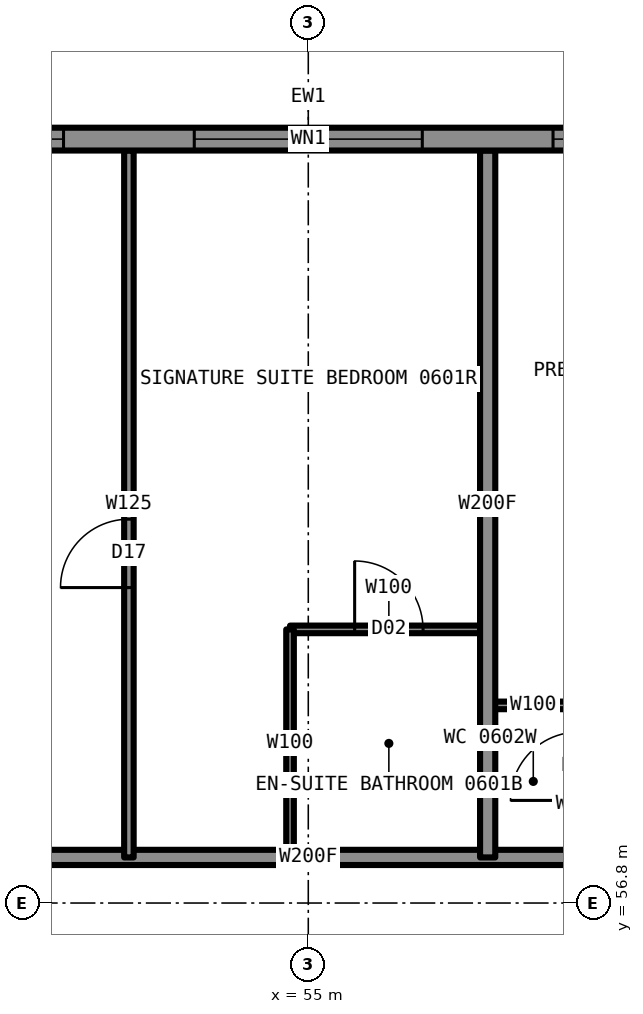
"""IFC4 building model, lengths in metres.
Left out: names, types, materials, properties, quantities, classifications, styles, units other than length and angle.
Written with IfcOpenShell. Run it as: python <this file> out.ifc"""

import sys

from ifc_helpers import new_model, si_unit, direction, frame, frame_2d, origin, place, context, subcontext, project, spatial, rectangle, extrude, element, fill, save


model = new_model("IFC4")
c1 = context("Model", 3, precision=1e-05, world=origin(), true_north=direction((0.0, 1.0)))
c2 = subcontext(c1, "Body", "Model", "MODEL_VIEW")
j1 = project(units=[si_unit("LENGTHUNIT", "METRE"), si_unit("PLANEANGLEUNIT", "RADIAN")], contexts=[c1])
p1 = place(None, origin())
s1 = spatial("IfcSite", under=j1, at=p1, CompositionType="ELEMENT")
p2 = place(p1, origin())
s2 = spatial("IfcBuilding", under=s1, at=p2, CompositionType="ELEMENT")
p3 = place(p2, frame((0.0, 0.0, 28.5)))
s3 = spatial("IfcBuildingStorey", under=s2, at=p3, CompositionType="ELEMENT", Elevation=28.5)
p4 = place(p3, frame((43.2, 57.4, 0.0), z_axis=(0.0, 0.0, 1.0), x_axis=(1.0, 0.0, 0.0)))
e1 = element("IfcWall", 1, at=p4, inside=s3, PredefinedType="PARTITIONING", context=c2, shape_type="SweptSolid", body=[
    extrude(rectangle(XDim=23.6, YDim=0.2, at=frame_2d((11.8, 0.0))), origin(), (0.0, 0.0, 1.0), 3.33),
])
p5 = place(p4, frame((1.85, 0.0, 0.0)))
e2 = element("IfcOpeningElement", 2, at=p5, cuts=e1, PredefinedType="OPENING", context=c2, shape_type="SweptSolid", body=[
    extrude(rectangle(XDim=1.1, YDim=2.2, at=frame_2d((0.55, 1.1))), frame((0.0, 0.11, 0.0), z_axis=(0.0, -1.0, 0.0), x_axis=(1.0, 0.0, 0.0)), (0.0, 0.0, 1.0), 0.22),
])
p6 = place(p4, frame((15.62, 0.0, 0.0)))
e3 = element("IfcOpeningElement", 3, at=p6, cuts=e1, PredefinedType="OPENING", context=c2, shape_type="SweptSolid", body=[
    extrude(rectangle(XDim=1.0, YDim=2.2, at=frame_2d((0.5, 1.1))), frame((0.0, 0.11, 0.0), z_axis=(0.0, -1.0, 0.0), x_axis=(1.0, 0.0, 0.0)), (0.0, 0.0, 1.0), 0.22),
])
p7 = place(p4, frame((20.34, 0.0, 0.0)))
e4 = element("IfcOpeningElement", 4, at=p7, cuts=e1, PredefinedType="OPENING", context=c2, shape_type="SweptSolid", body=[
    extrude(rectangle(XDim=1.0, YDim=2.2, at=frame_2d((0.5, 1.1))), frame((0.0, 0.11, 0.0), z_axis=(0.0, -1.0, 0.0), x_axis=(1.0, 0.0, 0.0)), (0.0, 0.0, 1.0), 0.22),
])
p8 = place(p3, frame((57.36, 59.4, 0.0), z_axis=(0.0, 0.0, 1.0), x_axis=(1.0, 0.0, 0.0)))
e5 = element("IfcWall", 5, at=p8, inside=s3, PredefinedType="PARTITIONING", context=c2, shape_type="SweptSolid", body=[
    extrude(rectangle(XDim=1.2, YDim=0.1, at=frame_2d((0.6, 0.0))), origin(), (0.0, 0.0, 1.0), 3.33),
])
p9 = place(p3, frame((54.76, 60.4, 0.0), z_axis=(0.0, 0.0, 1.0), x_axis=(1.0, 0.0, 0.0)))
e6 = element("IfcWall", 6, at=p9, inside=s3, PredefinedType="PARTITIONING", context=c2, shape_type="SweptSolid", body=[
    extrude(rectangle(XDim=2.6, YDim=0.1, at=frame_2d((1.3, 0.0))), origin(), (0.0, 0.0, 1.0), 3.33),
])
p10 = place(p9, frame((0.85, 0.0, 0.0)))
e7 = element("IfcOpeningElement", 7, at=p10, cuts=e6, PredefinedType="OPENING", context=c2, shape_type="SweptSolid", body=[
    extrude(rectangle(XDim=0.9, YDim=2.1, at=frame_2d((0.45, 1.05))), frame((0.0, 0.06, 0.0), z_axis=(0.0, -1.0, 0.0), x_axis=(1.0, 0.0, 0.0)), (0.0, 0.0, 1.0), 0.12),
])
p11 = place(p3, frame((54.76, 57.4, 0.0), z_axis=(0.0, 0.0, 1.0), x_axis=(0.0, 1.0, 0.0)))
e8 = element("IfcWall", 8, at=p11, inside=s3, PredefinedType="PARTITIONING", context=c2, shape_type="SweptSolid", body=[
    extrude(rectangle(XDim=3.0, YDim=0.1, at=frame_2d((1.5, 0.0))), origin(), (0.0, 0.0, 1.0), 3.33),
])
p12 = place(p3, frame((52.64, 57.4, 0.0), z_axis=(0.0, 0.0, 1.0), x_axis=(0.0, 1.0, 0.0)))
e9 = element("IfcWall", 9, at=p12, inside=s3, PredefinedType="PARTITIONING", context=c2, shape_type="SweptSolid", body=[
    extrude(rectangle(XDim=9.3, YDim=0.125, at=frame_2d((4.65, 0.0))), origin(), (0.0, 0.0, 1.0), 3.33),
])
p13 = place(p12, frame((3.55, 0.0, 0.0)))
e10 = element("IfcOpeningElement", 10, at=p13, cuts=e9, PredefinedType="OPENING", context=c2, shape_type="SweptSolid", body=[
    extrude(rectangle(XDim=0.9, YDim=2.2, at=frame_2d((0.45, 1.1))), frame((0.0, 0.073, 0.0), z_axis=(0.0, -1.0, 0.0), x_axis=(1.0, 0.0, 0.0)), (0.0, 0.0, 1.0), 0.145),
])
p14 = place(p3, frame((57.36, 57.4, 0.0), z_axis=(0.0, 0.0, 1.0), x_axis=(0.0, 1.0, 0.0)))
e11 = element("IfcWall", 11, at=p14, inside=s3, PredefinedType="PARTITIONING", context=c2, shape_type="SweptSolid", body=[
    extrude(rectangle(XDim=9.3, YDim=0.2, at=frame_2d((4.65, 0.0))), origin(), (0.0, 0.0, 1.0), 3.33),
])
p15 = place(p3, frame((71.5, 66.85, 0.0), z_axis=(0.0, 0.0, 1.0), x_axis=(-1.0, 0.0, 0.0)))
e12 = element("IfcWall", 12, at=p15, inside=s3, PredefinedType="SOLIDWALL", context=c2, shape_type="SweptSolid", body=[
    extrude(rectangle(XDim=33.0, YDim=0.3, at=frame_2d((16.5, 0.0))), origin(), (0.0, 0.0, 1.0), 2.83),
])
p16 = place(p15, frame((0.85, 0.0, 0.5)))
e13 = element("IfcOpeningElement", 13, at=p16, cuts=e12, PredefinedType="OPENING", context=c2, shape_type="SweptSolid", body=[
    extrude(rectangle(XDim=3.0, YDim=2.0, at=frame_2d((1.5, 1.0))), frame((0.0, 0.16, 0.0), z_axis=(0.0, -1.0, 0.0), x_axis=(1.0, 0.0, 0.0)), (0.0, 0.0, 1.0), 0.32),
])
p17 = place(p15, frame((5.56, 0.0, 0.5)))
e14 = element("IfcOpeningElement", 14, at=p17, cuts=e12, PredefinedType="OPENING", context=c2, shape_type="SweptSolid", body=[
    extrude(rectangle(XDim=3.0, YDim=2.0, at=frame_2d((1.5, 1.0))), frame((0.0, 0.16, 0.0), z_axis=(0.0, -1.0, 0.0), x_axis=(1.0, 0.0, 0.0)), (0.0, 0.0, 1.0), 0.32),
])
p18 = place(p15, frame((10.28, 0.0, 0.5)))
e15 = element("IfcOpeningElement", 15, at=p18, cuts=e12, PredefinedType="OPENING", context=c2, shape_type="SweptSolid", body=[
    extrude(rectangle(XDim=3.0, YDim=2.0, at=frame_2d((1.5, 1.0))), frame((0.0, 0.16, 0.0), z_axis=(0.0, -1.0, 0.0), x_axis=(1.0, 0.0, 0.0)), (0.0, 0.0, 1.0), 0.32),
])
p19 = place(p15, frame((15.0, 0.0, 0.5)))
e16 = element("IfcOpeningElement", 16, at=p19, cuts=e12, PredefinedType="OPENING", context=c2, shape_type="SweptSolid", body=[
    extrude(rectangle(XDim=3.0, YDim=2.0, at=frame_2d((1.5, 1.0))), frame((0.0, 0.16, 0.0), z_axis=(0.0, -1.0, 0.0), x_axis=(1.0, 0.0, 0.0)), (0.0, 0.0, 1.0), 0.32),
])
p20 = place(p15, frame((19.72, 0.0, 0.5)))
e17 = element("IfcOpeningElement", 17, at=p20, cuts=e12, PredefinedType="OPENING", context=c2, shape_type="SweptSolid", body=[
    extrude(rectangle(XDim=3.0, YDim=2.0, at=frame_2d((1.5, 1.0))), frame((0.0, 0.16, 0.0), z_axis=(0.0, -1.0, 0.0), x_axis=(1.0, 0.0, 0.0)), (0.0, 0.0, 1.0), 0.32),
])
p21 = place(p15, frame((24.44, 0.0, 0.5)))
e18 = element("IfcOpeningElement", 18, at=p21, cuts=e12, PredefinedType="OPENING", context=c2, shape_type="SweptSolid", body=[
    extrude(rectangle(XDim=3.0, YDim=2.0, at=frame_2d((1.5, 1.0))), frame((0.0, 0.16, 0.0), z_axis=(0.0, -1.0, 0.0), x_axis=(1.0, 0.0, 0.0)), (0.0, 0.0, 1.0), 0.32),
])
p22 = place(p15, frame((29.15, 0.0, 0.5)))
e19 = element("IfcOpeningElement", 19, at=p22, cuts=e12, PredefinedType="OPENING", context=c2, shape_type="SweptSolid", body=[
    extrude(rectangle(XDim=3.0, YDim=2.0, at=frame_2d((1.5, 1.0))), frame((0.0, 0.16, 0.0), z_axis=(0.0, -1.0, 0.0), x_axis=(1.0, 0.0, 0.0)), (0.0, 0.0, 1.0), 0.32),
])
p23 = place(p10, origin())
e20 = element("IfcDoor", 20, at=p23, inside=s3, OperationType="SINGLE_SWING_RIGHT", PredefinedType="DOOR", context=c2, shape_type="SweptSolid", body=[
    extrude(rectangle(XDim=0.9, YDim=2.1, at=frame_2d((0.45, 1.05))), frame((0.0, 0.025, 0.0), z_axis=(0.0, -1.0, 0.0), x_axis=(1.0, 0.0, 0.0)), (0.0, 0.0, 1.0), 0.05),
])
fill(e7, e20)
p24 = place(p13, origin())
e21 = element("IfcDoor", 21, at=p24, inside=s3, OperationType="SINGLE_SWING_LEFT", PredefinedType="DOOR", context=c2, shape_type="SweptSolid", body=[
    extrude(rectangle(XDim=0.9, YDim=2.2, at=frame_2d((0.45, 1.1))), frame((0.0, 0.025, 0.0), z_axis=(0.0, -1.0, 0.0), x_axis=(1.0, 0.0, 0.0)), (0.0, 0.0, 1.0), 0.05),
])
fill(e10, e21)
p25 = place(p18, origin())
e22 = element("IfcWindow", 22, at=p25, inside=s3, PartitioningType="SINGLE_PANEL", PredefinedType="WINDOW", context=c2, shape_type="SweptSolid", body=[
    extrude(rectangle(XDim=3.0, YDim=2.0, at=frame_2d((1.5, 1.0))), frame((0.0, 0.03, 0.0), z_axis=(0.0, -1.0, 0.0), x_axis=(1.0, 0.0, 0.0)), (0.0, 0.0, 1.0), 0.06),
])
fill(e15, e22)
p26 = place(p19, origin())
e23 = element("IfcWindow", 23, at=p26, inside=s3, PartitioningType="SINGLE_PANEL", PredefinedType="WINDOW", context=c2, shape_type="SweptSolid", body=[
    extrude(rectangle(XDim=3.0, YDim=2.0, at=frame_2d((1.5, 1.0))), frame((0.0, 0.03, 0.0), z_axis=(0.0, -1.0, 0.0), x_axis=(1.0, 0.0, 0.0)), (0.0, 0.0, 1.0), 0.06),
])
fill(e16, e23)
p27 = place(p20, origin())
e24 = element("IfcWindow", 24, at=p27, inside=s3, PartitioningType="SINGLE_PANEL", PredefinedType="WINDOW", context=c2, shape_type="SweptSolid", body=[
    extrude(rectangle(XDim=3.0, YDim=2.0, at=frame_2d((1.5, 1.0))), frame((0.0, 0.03, 0.0), z_axis=(0.0, -1.0, 0.0), x_axis=(1.0, 0.0, 0.0)), (0.0, 0.0, 1.0), 0.06),
])
fill(e17, e24)
save(model, sys.argv[1])
